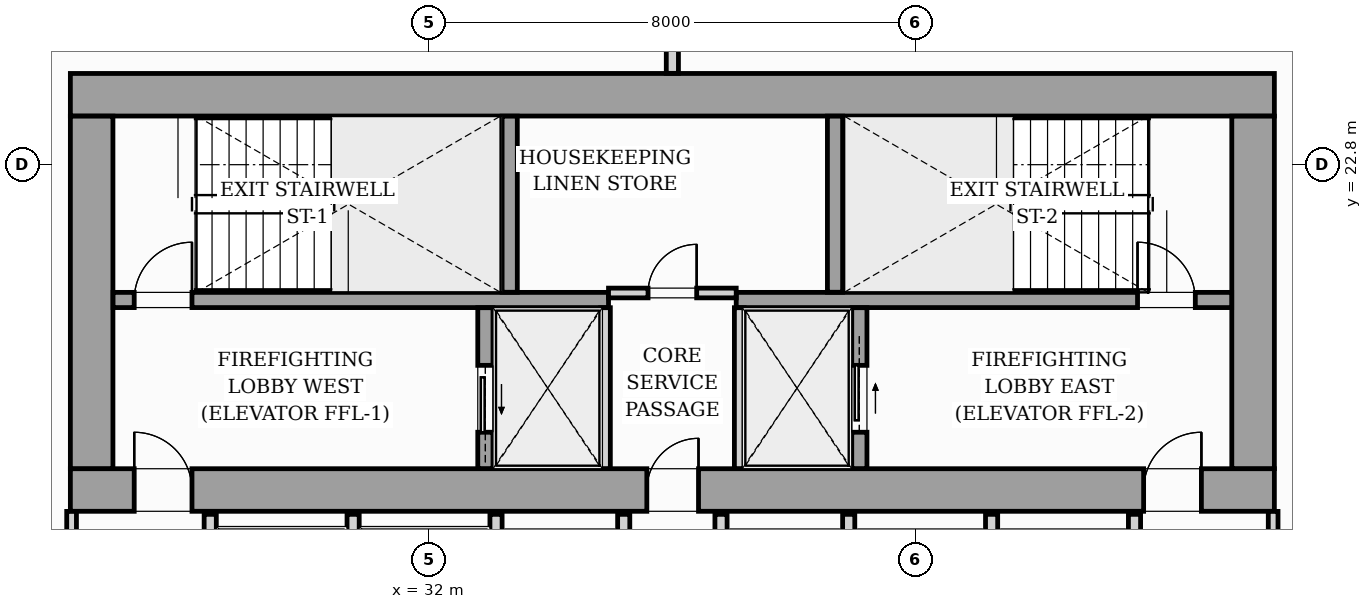
"""IFC4 building model, lengths in metres.
Left out: names, types, materials, properties, quantities, classifications, styles, units other than length and angle.
Written with IfcOpenShell. Run it as: python <this file> out.ifc"""

import sys

from ifc_helpers import new_model, si_unit, direction, frame, frame_2d, origin, origin_2d, place, context, subcontext, project, spatial, rectangle, i_section, extrude, source, transform, mapped, element, fill, save


model = new_model("IFC4")
c1 = context("Model", 3, precision=1e-05, world=origin(), true_north=direction((0.0, 1.0)))
c2 = subcontext(c1, "Body", "Model", "MODEL_VIEW")
j1 = project(units=[si_unit("LENGTHUNIT", "METRE"), si_unit("PLANEANGLEUNIT", "RADIAN")], contexts=[c1])
p1 = place(None, origin())
s1 = spatial("IfcSite", under=j1, at=p1, CompositionType="ELEMENT")
p2 = place(p1, origin())
s2 = spatial("IfcBuilding", under=s1, at=p2, CompositionType="ELEMENT")
p3 = place(p2, frame((0.0, 0.0, 93.8)))
s3 = spatial("IfcBuildingStorey", under=s2, at=p3, CompositionType="ELEMENT", Elevation=93.8)
m1 = source(origin(), c2, "Body", "SweptSolid", [
    extrude(i_section(OverallWidth=0.427, OverallDepth=0.483, WebThickness=0.051, FlangeThickness=0.082, FilletRadius=0.018, at=origin_2d()), origin(), (0.0, 0.0, 1.0), 3.196),
])
for number, where, z_axis, x_axis in (
    (1, (26.4, 17.4, 0.002), (0.0, 0.0, 1.0), (1.0, 0.0, 0.0)),
    (2, (33.12, 17.4, 0.002), (0.0, 0.0, 1.0), (1.0, 0.0, 0.0)),
    (3, (38.88, 17.4, 0.002), (0.0, 0.0, 1.0), (1.0, 0.0, 0.0)),
    (4, (45.6, 17.4, 0.002), (0.0, 0.0, 1.0), (1.0, 0.0, 0.0)),
    (5, (26.4, 24.0, 0.002), (0.0, 0.0, 1.0), (1.0, 0.0, 0.0)),
    (6, (33.12, 24.0, 0.002), (0.0, 0.0, 1.0), (1.0, 0.0, 0.0)),
    (7, (38.88, 24.0, 0.002), (0.0, 0.0, 1.0), (1.0, 0.0, 0.0)),
    (8, (45.6, 24.0, 0.002), (0.0, 0.0, 1.0), (1.0, 0.0, 0.0)),
):
    element("IfcColumn", number, at=place(p3, frame(where, z_axis=z_axis, x_axis=x_axis)), inside=s3, PredefinedType="PILASTER", context=c2, shape_type="MappedRepresentation", body=[
        mapped(m1, transform((0.0, 0.0, 0.0), scale=1.0)),
    ])
p4 = place(p3, frame((11.08, 23.508, 0.0), z_axis=(0.0, 0.0, 1.0), x_axis=(0.995396638587, 0.095841180552, 0.0)))
e9 = element("IfcWall", 9, at=p4, inside=s3, PredefinedType="STANDARD", context=c2, shape_type="SweptSolid", body=[
    extrude(rectangle(XDim=19.11, YDim=0.26, at=frame_2d((9.555, 0.0))), origin(), (0.0, 0.0, 1.0), 2.94),
])
p5 = place(p4, frame((8.251, 0.0, 0.0)))
e10 = element("IfcOpeningElement", 10, at=p5, cuts=e9, PredefinedType="OPENING", context=c2, shape_type="SweptSolid", body=[
    extrude(rectangle(XDim=1.8, YDim=2.06, at=frame_2d((0.9, 1.03))), frame((0.0, 0.14, 0.0), z_axis=(0.0, -1.0, 0.0), x_axis=(1.0, 0.0, 0.0)), (0.0, 0.0, 1.0), 0.28),
])
p6 = place(p4, frame((2.05, 0.0, 0.65)))
e11 = element("IfcOpeningElement", 11, at=p6, cuts=e9, PredefinedType="OPENING", context=c2, shape_type="SweptSolid", body=[
    extrude(rectangle(XDim=1.6, YDim=1.5, at=frame_2d((0.8, 0.75))), frame((0.0, 0.14, 0.0), z_axis=(0.0, -1.0, 0.0), x_axis=(1.0, 0.0, 0.0)), (0.0, 0.0, 1.0), 0.28),
])
p7 = place(p3, frame((26.1, 17.45, 0.0), z_axis=(0.0, 0.0, 1.0), x_axis=(1.0, 0.0, 0.0)))
e12 = element("IfcWall", 12, at=p7, inside=s3, PredefinedType="SHEAR", context=c2, shape_type="SweptSolid", body=[
    extrude(rectangle(XDim=19.8, YDim=0.7, at=frame_2d((9.9, 0.0))), origin(), (0.0, 0.0, 1.0), 3.2),
])
p8 = place(p7, frame((1.05, 0.0, 0.0)))
e13 = element("IfcOpeningElement", 13, at=p8, cuts=e12, PredefinedType="OPENING", context=c2, shape_type="SweptSolid", body=[
    extrude(rectangle(XDim=0.95, YDim=2.06, at=frame_2d((0.475, 1.03))), frame((0.0, 0.36, 0.0), z_axis=(0.0, -1.0, 0.0), x_axis=(1.0, 0.0, 0.0)), (0.0, 0.0, 1.0), 0.72),
])
p9 = place(p7, frame((9.48, 0.0, 0.0)))
e14 = element("IfcOpeningElement", 14, at=p9, cuts=e12, PredefinedType="OPENING", context=c2, shape_type="SweptSolid", body=[
    extrude(rectangle(XDim=0.85, YDim=2.0, at=frame_2d((0.425, 1.0))), frame((0.0, 0.36, 0.0), z_axis=(0.0, -1.0, 0.0), x_axis=(1.0, 0.0, 0.0)), (0.0, 0.0, 1.0), 0.72),
])
p10 = place(p7, frame((17.65, 0.0, 0.0)))
e15 = element("IfcOpeningElement", 15, at=p10, cuts=e12, PredefinedType="OPENING", context=c2, shape_type="SweptSolid", body=[
    extrude(rectangle(XDim=0.95, YDim=2.06, at=frame_2d((0.475, 1.03))), frame((0.0, 0.36, 0.0), z_axis=(0.0, -1.0, 0.0), x_axis=(1.0, 0.0, 0.0)), (0.0, 0.0, 1.0), 0.72),
])
p11 = place(p3, frame((26.1, 23.95, 0.0), z_axis=(0.0, 0.0, 1.0), x_axis=(1.0, 0.0, 0.0)))
e16 = element("IfcWall", 16, at=p11, inside=s3, PredefinedType="SHEAR", context=c2, shape_type="SweptSolid", body=[
    extrude(rectangle(XDim=19.8, YDim=0.7, at=frame_2d((9.9, 0.0))), origin(), (0.0, 0.0, 1.0), 3.2),
])
for number, where, z_axis, x_axis in (
    (17, (26.45, 17.802, 0.0), (0.0, 0.0, 1.0), (0.0, 1.0, 0.0)),
    (18, (45.55, 17.802, 0.0), (0.0, 0.0, 1.0), (0.0, 1.0, 0.0)),
):
    element("IfcWall", number, at=place(p3, frame(where, z_axis=z_axis, x_axis=x_axis)), inside=s3, PredefinedType="SHEAR", context=c2, shape_type="SweptSolid", body=[
        extrude(rectangle(XDim=5.796, YDim=0.7, at=frame_2d((2.898, 0.0))), origin(), (0.0, 0.0, 1.0), 3.2),
    ])
p12 = place(p3, frame((26.802, 20.575, 0.0), z_axis=(0.0, 0.0, 1.0), x_axis=(1.0, 0.0, 0.0)))
e19 = element("IfcWall", 19, at=p12, inside=s3, PredefinedType="SOLIDWALL", context=c2, shape_type="SweptSolid", body=[
    extrude(rectangle(XDim=8.148, YDim=0.25, at=frame_2d((4.074, 0.0))), origin(), (0.0, 0.0, 1.0), 3.2),
])
p13 = place(p12, frame((0.348, 0.0, 0.0)))
e20 = element("IfcOpeningElement", 20, at=p13, cuts=e19, PredefinedType="OPENING", context=c2, shape_type="SweptSolid", body=[
    extrude(rectangle(XDim=0.95, YDim=2.06, at=frame_2d((0.475, 1.03))), frame((0.0, 0.135, 0.0), z_axis=(0.0, -1.0, 0.0), x_axis=(1.0, 0.0, 0.0)), (0.0, 0.0, 1.0), 0.27),
])
p14 = place(p3, frame((37.05, 20.575, 0.0), z_axis=(0.0, 0.0, 1.0), x_axis=(1.0, 0.0, 0.0)))
e21 = element("IfcWall", 21, at=p14, inside=s3, PredefinedType="SOLIDWALL", context=c2, shape_type="SweptSolid", body=[
    extrude(rectangle(XDim=8.148, YDim=0.25, at=frame_2d((4.074, 0.0))), origin(), (0.0, 0.0, 1.0), 3.2),
])
p15 = place(p14, frame((6.6, 0.0, 0.0)))
e22 = element("IfcOpeningElement", 22, at=p15, cuts=e21, PredefinedType="OPENING", context=c2, shape_type="SweptSolid", body=[
    extrude(rectangle(XDim=0.95, YDim=2.06, at=frame_2d((0.475, 1.03))), frame((0.0, 0.135, 0.0), z_axis=(0.0, -1.0, 0.0), x_axis=(1.0, 0.0, 0.0)), (0.0, 0.0, 1.0), 0.27),
])
for number, where, z_axis, x_axis in (
    (23, (33.325, 20.702, 0.0), (0.0, 0.0, 1.0), (0.0, 1.0, 0.0)),
    (24, (38.675, 20.702, 0.0), (0.0, 0.0, 1.0), (0.0, 1.0, 0.0)),
):
    element("IfcWall", number, at=place(p3, frame(where, z_axis=z_axis, x_axis=x_axis)), inside=s3, PredefinedType="SOLIDWALL", context=c2, shape_type="SweptSolid", body=[
        extrude(rectangle(XDim=2.896, YDim=0.25, at=frame_2d((1.448, 0.0))), origin(), (0.0, 0.0, 1.0), 3.2),
    ])
p16 = place(p3, frame((32.925, 17.802, 0.0), z_axis=(0.0, 0.0, 1.0), x_axis=(0.0, 1.0, 0.0)))
e25 = element("IfcWall", 25, at=p16, inside=s3, PredefinedType="SOLIDWALL", context=c2, shape_type="SweptSolid", body=[
    extrude(rectangle(XDim=2.646, YDim=0.25, at=frame_2d((1.323, 0.0))), origin(), (0.0, 0.0, 1.0), 3.2),
])
p17 = place(p16, frame((0.598, 0.0, 0.0)))
e26 = element("IfcOpeningElement", 26, at=p17, cuts=e25, PredefinedType="OPENING", context=c2, shape_type="SweptSolid", body=[
    extrude(rectangle(XDim=1.1, YDim=2.08, at=frame_2d((0.55, 1.04))), frame((0.0, 0.135, 0.0), z_axis=(0.0, -1.0, 0.0), x_axis=(1.0, 0.0, 0.0)), (0.0, 0.0, 1.0), 0.27),
])
for number, where, z_axis, x_axis in (
    (27, (34.9, 17.802, 0.0), (0.0, 0.0, 1.0), (0.0, 1.0, 0.0)),
    (28, (37.1, 17.802, 0.0), (0.0, 0.0, 1.0), (0.0, 1.0, 0.0)),
):
    element("IfcWall", number, at=place(p3, frame(where, z_axis=z_axis, x_axis=x_axis)), inside=s3, PredefinedType="PARTITIONING", context=c2, shape_type="SweptSolid", body=[
        extrude(rectangle(XDim=2.646, YDim=0.16, at=frame_2d((1.323, 0.0))), origin(), (0.0, 0.0, 1.0), 2.94),
    ])
p18 = place(p3, frame((39.075, 17.802, 0.0), z_axis=(0.0, 0.0, 1.0), x_axis=(0.0, 1.0, 0.0)))
e29 = element("IfcWall", 29, at=p18, inside=s3, PredefinedType="SOLIDWALL", context=c2, shape_type="SweptSolid", body=[
    extrude(rectangle(XDim=2.646, YDim=0.25, at=frame_2d((1.323, 0.0))), origin(), (0.0, 0.0, 1.0), 3.2),
])
p19 = place(p18, frame((0.598, 0.0, 0.0)))
e30 = element("IfcOpeningElement", 30, at=p19, cuts=e29, PredefinedType="OPENING", context=c2, shape_type="SweptSolid", body=[
    extrude(rectangle(XDim=1.1, YDim=2.08, at=frame_2d((0.55, 1.04))), frame((0.0, 0.135, 0.0), z_axis=(0.0, -1.0, 0.0), x_axis=(1.0, 0.0, 0.0)), (0.0, 0.0, 1.0), 0.27),
])
p20 = place(p3, frame((34.95, 20.69, 0.0), z_axis=(0.0, 0.0, 1.0), x_axis=(1.0, 0.0, 0.0)))
e31 = element("IfcWall", 31, at=p20, inside=s3, PredefinedType="PARTITIONING", context=c2, shape_type="SweptSolid", body=[
    extrude(rectangle(XDim=2.1, YDim=0.16, at=frame_2d((1.05, 0.0))), origin(), (0.0, 0.0, 1.0), 2.94),
])
p21 = place(p20, frame((0.65, 0.0, 0.0)))
e32 = element("IfcOpeningElement", 32, at=p21, cuts=e31, PredefinedType="OPENING", context=c2, shape_type="SweptSolid", body=[
    extrude(rectangle(XDim=0.8, YDim=2.05, at=frame_2d((0.4, 1.025))), frame((0.0, 0.09, 0.0), z_axis=(0.0, -1.0, 0.0), x_axis=(1.0, 0.0, 0.0)), (0.0, 0.0, 1.0), 0.18),
])
for number, where, z_axis, x_axis in (
    (33, (28.4, 14.75, 0.0), (0.0, 0.0, 1.0), (0.0, 1.0, 0.0)),
    (34, (30.75, 14.75, 0.0), (0.0, 0.0, 1.0), (0.0, 1.0, 0.0)),
    (35, (33.1, 14.75, 0.0), (0.0, 0.0, 1.0), (0.0, 1.0, 0.0)),
    (36, (35.2, 14.75, 0.0), (0.0, 0.0, 1.0), (0.0, 1.0, 0.0)),
    (37, (36.8, 14.75, 0.0), (0.0, 0.0, 1.0), (0.0, 1.0, 0.0)),
    (38, (38.9, 14.75, 0.0), (0.0, 0.0, 1.0), (0.0, 1.0, 0.0)),
    (39, (41.25, 14.75, 0.0), (0.0, 0.0, 1.0), (0.0, 1.0, 0.0)),
    (40, (43.6, 14.75, 0.0), (0.0, 0.0, 1.0), (0.0, 1.0, 0.0)),
):
    element("IfcWall", number, at=place(p3, frame(where, z_axis=z_axis, x_axis=x_axis)), inside=s3, PredefinedType="PARTITIONING", context=c2, shape_type="SweptSolid", body=[
        extrude(rectangle(XDim=2.3, YDim=0.2, at=frame_2d((1.15, 0.0))), origin(), (0.0, 0.0, 1.0), 2.94),
    ])
p22 = place(p3, frame((36.0, 24.302, 0.0), z_axis=(0.0, 0.0, 1.0), x_axis=(0.0, 1.0, 0.0)))
e41 = element("IfcWall", 41, at=p22, inside=s3, PredefinedType="PARTITIONING", context=c2, shape_type="SweptSolid", body=[
    extrude(rectangle(XDim=1.656, YDim=0.2, at=frame_2d((0.828, 0.0))), origin(), (0.0, 0.0, 1.0), 2.94),
])
for number, where, z_axis, x_axis in (
    (42, (26.12, 14.762, 0.0), (0.0, 0.0, 1.0), (0.0, 1.0, 0.0)),
    (43, (45.88, 14.762, 0.0), (0.0, 0.0, 1.0), (0.0, 1.0, 0.0)),
):
    element("IfcWall", number, at=place(p3, frame(where, z_axis=z_axis, x_axis=x_axis)), inside=s3, PredefinedType="PARTITIONING", context=c2, shape_type="SweptSolid", body=[
        extrude(rectangle(XDim=2.336, YDim=0.16, at=frame_2d((1.168, 0.0))), origin(), (0.0, 0.0, 1.0), 2.94),
    ])
m2 = source(origin(), c2, "Body", "SweptSolid", [
    extrude(rectangle(XDim=0.95, YDim=2.06, at=frame_2d((0.475, 1.03))), frame((0.0, 0.025, 0.0), z_axis=(0.0, -1.0, 0.0), x_axis=(1.0, 0.0, 0.0)), (0.0, 0.0, 1.0), 0.05),
])
p23 = place(p8, origin())
e44 = element("IfcDoor", 44, at=p23, inside=s3, OperationType="SINGLE_SWING_LEFT", PredefinedType="DOOR", context=c2, shape_type="MappedRepresentation", body=[
    mapped(m2, transform((0.0, 0.0, 0.0), scale=1.0)),
])
fill(e13, e44)
m3 = source(origin(), c2, "Body", "SweptSolid", [
    extrude(rectangle(XDim=0.85, YDim=2.0, at=frame_2d((0.425, 1.0))), frame((0.0, 0.025, 0.0), z_axis=(0.0, -1.0, 0.0), x_axis=(1.0, 0.0, 0.0)), (0.0, 0.0, 1.0), 0.05),
])
p24 = place(p9, origin())
e45 = element("IfcDoor", 45, at=p24, inside=s3, OperationType="SINGLE_SWING_RIGHT", PredefinedType="DOOR", context=c2, shape_type="MappedRepresentation", body=[
    mapped(m3, transform((0.0, 0.0, 0.0), scale=1.0)),
])
fill(e14, e45)
p25 = place(p10, origin())
e46 = element("IfcDoor", 46, at=p25, inside=s3, OperationType="SINGLE_SWING_RIGHT", PredefinedType="DOOR", context=c2, shape_type="MappedRepresentation", body=[
    mapped(m2, transform((0.0, 0.0, 0.0), scale=1.0)),
])
fill(e15, e46)
p26 = place(p13, origin())
e47 = element("IfcDoor", 47, at=p26, inside=s3, OperationType="SINGLE_SWING_RIGHT", PredefinedType="DOOR", context=c2, shape_type="MappedRepresentation", body=[
    mapped(m2, transform((0.0, 0.0, 0.0), scale=1.0)),
])
fill(e20, e47)
p27 = place(p15, origin())
e48 = element("IfcDoor", 48, at=p27, inside=s3, OperationType="SINGLE_SWING_LEFT", PredefinedType="DOOR", context=c2, shape_type="MappedRepresentation", body=[
    mapped(m2, transform((0.0, 0.0, 0.0), scale=1.0)),
])
fill(e22, e48)
m4 = source(origin(), c2, "Body", "SweptSolid", [
    extrude(rectangle(XDim=1.1, YDim=2.08, at=frame_2d((0.55, 1.04))), frame((0.0, 0.025, 0.0), z_axis=(0.0, -1.0, 0.0), x_axis=(1.0, 0.0, 0.0)), (0.0, 0.0, 1.0), 0.05),
])
p28 = place(p17, origin())
e49 = element("IfcDoor", 49, at=p28, inside=s3, OperationType="SLIDING_TO_LEFT", PredefinedType="DOOR", context=c2, shape_type="MappedRepresentation", body=[
    mapped(m4, transform((0.0, 0.0, 0.0), scale=1.0)),
])
fill(e26, e49)
p29 = place(p19, origin())
e50 = element("IfcDoor", 50, at=p29, inside=s3, OperationType="SLIDING_TO_RIGHT", PredefinedType="DOOR", context=c2, shape_type="MappedRepresentation", body=[
    mapped(m4, transform((0.0, 0.0, 0.0), scale=1.0)),
])
fill(e30, e50)
m5 = source(origin(), c2, "Body", "SweptSolid", [
    extrude(rectangle(XDim=0.8, YDim=2.05, at=frame_2d((0.4, 1.025))), frame((0.0, 0.025, 0.0), z_axis=(0.0, -1.0, 0.0), x_axis=(1.0, 0.0, 0.0)), (0.0, 0.0, 1.0), 0.05),
])
p30 = place(p21, origin())
e51 = element("IfcDoor", 51, at=p30, inside=s3, OperationType="SINGLE_SWING_RIGHT", PredefinedType="DOOR", context=c2, shape_type="MappedRepresentation", body=[
    mapped(m5, transform((0.0, 0.0, 0.0), scale=1.0)),
])
fill(e32, e51)
save(model, sys.argv[1])
